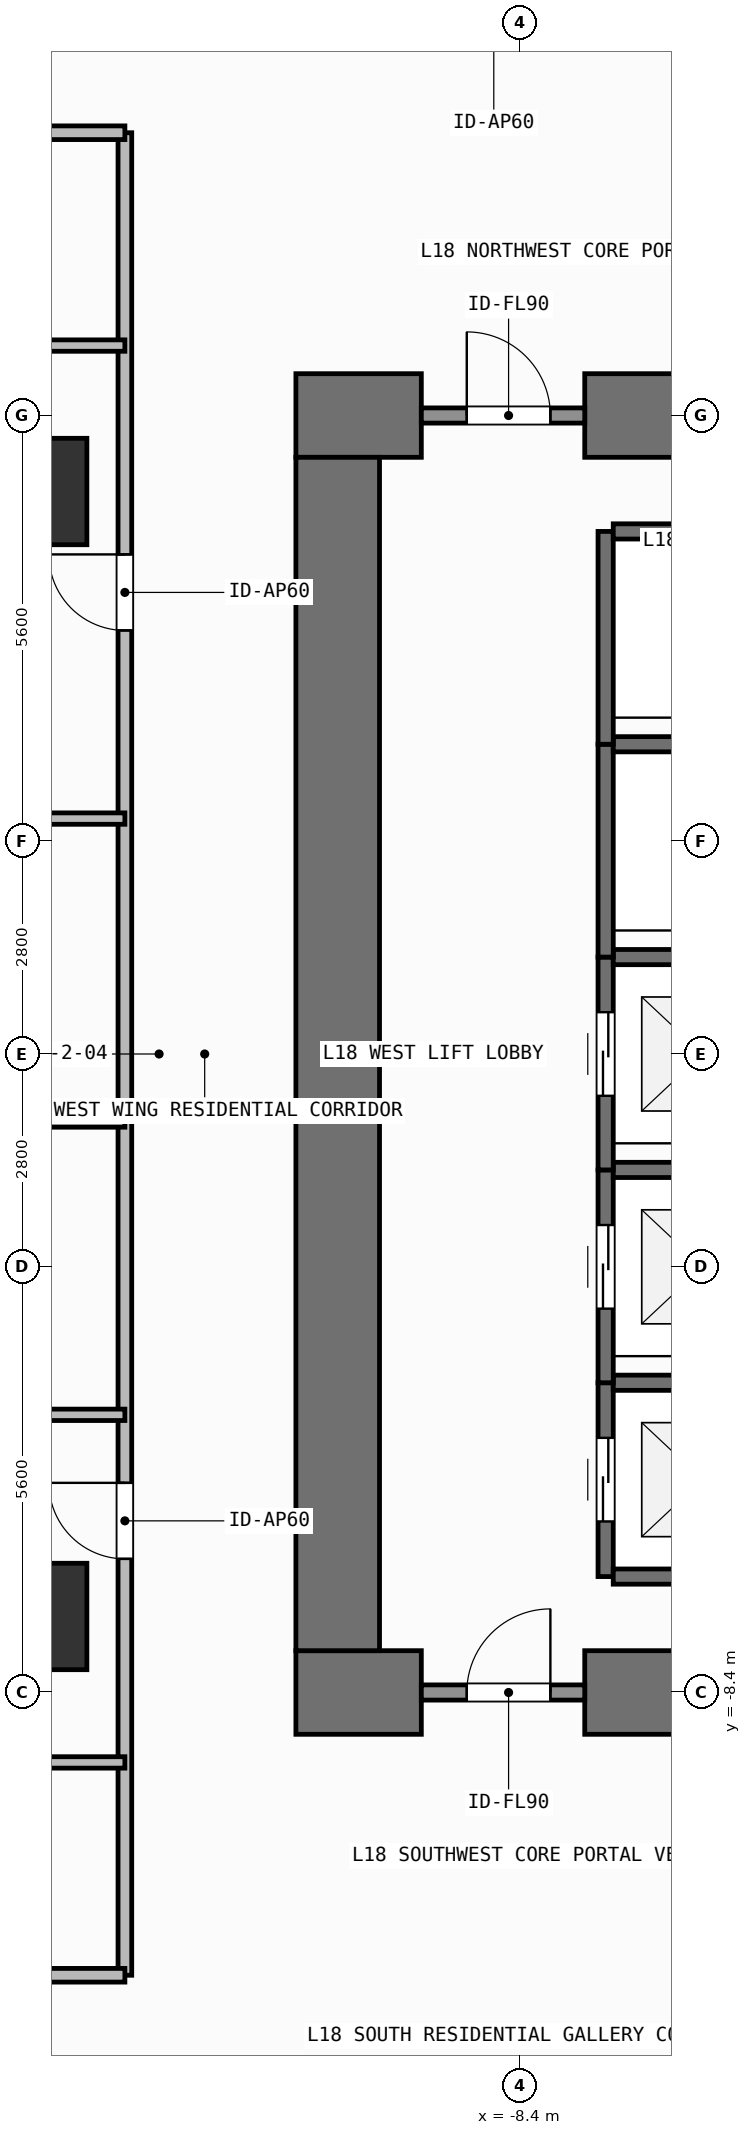
"""IFC4 building model, lengths in metres.
Left out: names, types, materials, properties, quantities, classifications, styles, units other than length and angle.
Written with IfcOpenShell. Run it as: python <this file> out.ifc"""

import sys

from ifc_helpers import new_model, si_unit, direction, frame, frame_2d, origin, origin_2d, place, context, subcontext, project, spatial, rectangle, extrude, element, fill, save


model = new_model("IFC4")
c1 = context("Model", 3, precision=1e-05, world=origin(), true_north=direction((0.0, 1.0)))
c2 = subcontext(c1, "Body", "Model", "MODEL_VIEW")
j1 = project(units=[si_unit("LENGTHUNIT", "METRE"), si_unit("PLANEANGLEUNIT", "RADIAN")], contexts=[c1])
p1 = place(None, origin())
s1 = spatial("IfcSite", under=j1, at=p1, CompositionType="ELEMENT")
p2 = place(p1, origin())
s2 = spatial("IfcBuilding", under=s1, at=p2, CompositionType="ELEMENT")
p3 = place(p2, frame((0.0, 0.0, 69.6)))
s3 = spatial("IfcBuildingStorey", under=s2, at=p3, CompositionType="ELEMENT", Elevation=69.6)
p4 = place(p3, frame((-11.35, -8.4, 0.0), z_axis=(0.0, 0.0, 1.0), x_axis=(1.0, 0.0, 0.0)))
e1 = element("IfcWall", 1, at=p4, inside=s3, PredefinedType="SHEAR", context=c2, shape_type="SweptSolid", body=[
    extrude(rectangle(XDim=1.65, YDim=1.1, at=frame_2d((0.825, 0.0))), origin(), (0.0, 0.0, 1.0), 3.9),
])
p5 = place(p3, frame((-7.55, -8.4, 0.0), z_axis=(0.0, 0.0, 1.0), x_axis=(1.0, 0.0, 0.0)))
e2 = element("IfcWall", 2, at=p5, inside=s3, PredefinedType="SHEAR", context=c2, shape_type="SweptSolid", body=[
    extrude(rectangle(XDim=3.35, YDim=1.1, at=frame_2d((1.675, 0.0))), origin(), (0.0, 0.0, 1.0), 3.9),
])
p6 = place(p3, frame((-11.35, 8.4, 0.0), z_axis=(0.0, 0.0, 1.0), x_axis=(1.0, 0.0, 0.0)))
e3 = element("IfcWall", 3, at=p6, inside=s3, PredefinedType="SHEAR", context=c2, shape_type="SweptSolid", body=[
    extrude(rectangle(XDim=1.65, YDim=1.1, at=frame_2d((0.825, 0.0))), origin(), (0.0, 0.0, 1.0), 3.9),
])
p7 = place(p3, frame((-7.55, 8.4, 0.0), z_axis=(0.0, 0.0, 1.0), x_axis=(1.0, 0.0, 0.0)))
e4 = element("IfcWall", 4, at=p7, inside=s3, PredefinedType="SHEAR", context=c2, shape_type="SweptSolid", body=[
    extrude(rectangle(XDim=16.5, YDim=1.1, at=frame_2d((8.25, 0.0))), origin(), (0.0, 0.0, 1.0), 3.9),
])
p8 = place(p3, frame((-10.8, -7.85, 0.0), z_axis=(0.0, 0.0, 1.0), x_axis=(0.0, 1.0, 0.0)))
e5 = element("IfcWall", 5, at=p8, inside=s3, PredefinedType="SHEAR", context=c2, shape_type="SweptSolid", body=[
    extrude(rectangle(XDim=15.7, YDim=1.1, at=frame_2d((7.85, 0.0))), origin(), (0.0, 0.0, 1.0), 3.9),
])
for number, where, z_axis, x_axis in (
    (6, (-14.8, -7.4, 0.0), (0.0, 0.0, 1.0), (1.0, 0.0, 0.0)),
    (7, (-14.8, 7.4, 0.0), (0.0, 0.0, 1.0), (1.0, 0.0, 0.0)),
):
    element("IfcColumn", number, at=place(p3, frame(where, z_axis=z_axis, x_axis=x_axis)), inside=s3, PredefinedType="COLUMN", context=c2, shape_type="SweptSolid", body=[
        extrude(rectangle(XDim=1.4, YDim=1.4, at=origin_2d()), origin(), (0.0, 0.0, 1.0), 3.9),
    ])
p9 = place(p3, frame((-7.275, -6.875, 0.0), z_axis=(0.0, 0.0, 1.0), x_axis=(0.0, 1.0, 0.0)))
e8 = element("IfcWall", 8, at=p9, inside=s3, PredefinedType="SHEAR", context=c2, shape_type="SweptSolid", body=[
    extrude(rectangle(XDim=2.55, YDim=0.2, at=frame_2d((1.275, 0.0))), origin(), (0.0, 0.0, 1.0), 3.68),
])
p10 = place(p9, frame((0.725, 0.0, 0.0)))
e9 = element("IfcOpeningElement", 9, at=p10, cuts=e8, PredefinedType="OPENING", context=c2, shape_type="SweptSolid", body=[
    extrude(rectangle(XDim=1.1, YDim=2.2, at=frame_2d((0.55, 1.1))), frame((0.0, 0.11, 0.0), z_axis=(0.0, -1.0, 0.0), x_axis=(1.0, 0.0, 0.0)), (0.0, 0.0, 1.0), 0.22),
])
for number, where, z_axis, x_axis in (
    (10, (-7.175, -6.875, 0.0), (0.0, 0.0, 1.0), (1.0, 0.0, 0.0)),
    (11, (-7.175, -4.325, 0.0), (0.0, 0.0, 1.0), (1.0, 0.0, 0.0)),
):
    element("IfcWall", number, at=place(p3, frame(where, z_axis=z_axis, x_axis=x_axis)), inside=s3, PredefinedType="SHEAR", context=c2, shape_type="SweptSolid", body=[
        extrude(rectangle(XDim=2.35, YDim=0.2, at=frame_2d((1.175, 0.0))), origin(), (0.0, 0.0, 1.0), 3.68),
    ])
p11 = place(p3, frame((-7.275, -4.325, 0.0), z_axis=(0.0, 0.0, 1.0), x_axis=(0.0, 1.0, 0.0)))
e12 = element("IfcWall", 12, at=p11, inside=s3, PredefinedType="SHEAR", context=c2, shape_type="SweptSolid", body=[
    extrude(rectangle(XDim=2.8, YDim=0.2, at=frame_2d((1.4, 0.0))), origin(), (0.0, 0.0, 1.0), 3.68),
])
p12 = place(p11, frame((0.975, 0.0, 0.0)))
e13 = element("IfcOpeningElement", 13, at=p12, cuts=e12, PredefinedType="OPENING", context=c2, shape_type="SweptSolid", body=[
    extrude(rectangle(XDim=1.1, YDim=2.2, at=frame_2d((0.55, 1.1))), frame((0.0, 0.11, 0.0), z_axis=(0.0, -1.0, 0.0), x_axis=(1.0, 0.0, 0.0)), (0.0, 0.0, 1.0), 0.22),
])
p13 = place(p3, frame((-7.175, -1.525, 0.0), z_axis=(0.0, 0.0, 1.0), x_axis=(1.0, 0.0, 0.0)))
e14 = element("IfcWall", 14, at=p13, inside=s3, PredefinedType="SHEAR", context=c2, shape_type="SweptSolid", body=[
    extrude(rectangle(XDim=2.35, YDim=0.2, at=frame_2d((1.175, 0.0))), origin(), (0.0, 0.0, 1.0), 3.68),
])
p14 = place(p3, frame((-7.275, -1.525, 0.0), z_axis=(0.0, 0.0, 1.0), x_axis=(0.0, 1.0, 0.0)))
e15 = element("IfcWall", 15, at=p14, inside=s3, PredefinedType="SHEAR", context=c2, shape_type="SweptSolid", body=[
    extrude(rectangle(XDim=2.8, YDim=0.2, at=frame_2d((1.4, 0.0))), origin(), (0.0, 0.0, 1.0), 3.68),
])
p15 = place(p14, frame((0.975, 0.0, 0.0)))
e16 = element("IfcOpeningElement", 16, at=p15, cuts=e15, PredefinedType="OPENING", context=c2, shape_type="SweptSolid", body=[
    extrude(rectangle(XDim=1.1, YDim=2.2, at=frame_2d((0.55, 1.1))), frame((0.0, 0.11, 0.0), z_axis=(0.0, -1.0, 0.0), x_axis=(1.0, 0.0, 0.0)), (0.0, 0.0, 1.0), 0.22),
])
p16 = place(p3, frame((-7.175, 1.275, 0.0), z_axis=(0.0, 0.0, 1.0), x_axis=(1.0, 0.0, 0.0)))
e17 = element("IfcWall", 17, at=p16, inside=s3, PredefinedType="SHEAR", context=c2, shape_type="SweptSolid", body=[
    extrude(rectangle(XDim=2.35, YDim=0.2, at=frame_2d((1.175, 0.0))), origin(), (0.0, 0.0, 1.0), 3.68),
])
p17 = place(p3, frame((-7.275, 1.275, 0.0), z_axis=(0.0, 0.0, 1.0), x_axis=(0.0, 1.0, 0.0)))
e18 = element("IfcWall", 18, at=p17, inside=s3, PredefinedType="SHEAR", context=c2, shape_type="SweptSolid", body=[
    extrude(rectangle(XDim=2.8, YDim=0.2, at=frame_2d((1.4, 0.0))), origin(), (0.0, 0.0, 1.0), 3.68),
])
p18 = place(p3, frame((-7.175, 4.075, 0.0), z_axis=(0.0, 0.0, 1.0), x_axis=(1.0, 0.0, 0.0)))
e19 = element("IfcWall", 19, at=p18, inside=s3, PredefinedType="SHEAR", context=c2, shape_type="SweptSolid", body=[
    extrude(rectangle(XDim=2.35, YDim=0.2, at=frame_2d((1.175, 0.0))), origin(), (0.0, 0.0, 1.0), 3.68),
])
p19 = place(p3, frame((-7.275, 4.075, 0.0), z_axis=(0.0, 0.0, 1.0), x_axis=(0.0, 1.0, 0.0)))
e20 = element("IfcWall", 20, at=p19, inside=s3, PredefinedType="SHEAR", context=c2, shape_type="SweptSolid", body=[
    extrude(rectangle(XDim=2.8, YDim=0.2, at=frame_2d((1.4, 0.0))), origin(), (0.0, 0.0, 1.0), 3.68),
])
p20 = place(p3, frame((-7.175, 6.875, 0.0), z_axis=(0.0, 0.0, 1.0), x_axis=(1.0, 0.0, 0.0)))
e21 = element("IfcWall", 21, at=p20, inside=s3, PredefinedType="SHEAR", context=c2, shape_type="SweptSolid", body=[
    extrude(rectangle(XDim=2.35, YDim=0.2, at=frame_2d((1.175, 0.0))), origin(), (0.0, 0.0, 1.0), 3.68),
])
p21 = place(p3, frame((-9.7, -8.4, 0.0), z_axis=(0.0, 0.0, 1.0), x_axis=(1.0, 0.0, 0.0)))
e22 = element("IfcWall", 22, at=p21, inside=s3, PredefinedType="SOLIDWALL", context=c2, shape_type="SweptSolid", body=[
    extrude(rectangle(XDim=2.15, YDim=0.2, at=frame_2d((1.075, 0.0))), origin(), (0.0, 0.0, 1.0), 2.72),
])
p22 = place(p21, frame((0.598, 0.0, 0.0)))
e23 = element("IfcOpeningElement", 23, at=p22, cuts=e22, PredefinedType="OPENING", context=c2, shape_type="SweptSolid", body=[
    extrude(rectangle(XDim=1.1, YDim=2.15, at=frame_2d((0.55, 1.075))), frame((0.0, 0.11, 0.0), z_axis=(0.0, -1.0, 0.0), x_axis=(1.0, 0.0, 0.0)), (0.0, 0.0, 1.0), 0.22),
])
p23 = place(p3, frame((-9.7, 8.4, 0.0), z_axis=(0.0, 0.0, 1.0), x_axis=(1.0, 0.0, 0.0)))
e24 = element("IfcWall", 24, at=p23, inside=s3, PredefinedType="SOLIDWALL", context=c2, shape_type="SweptSolid", body=[
    extrude(rectangle(XDim=2.15, YDim=0.2, at=frame_2d((1.075, 0.0))), origin(), (0.0, 0.0, 1.0), 2.72),
])
p24 = place(p23, frame((0.598, 0.0, 0.0)))
e25 = element("IfcOpeningElement", 25, at=p24, cuts=e24, PredefinedType="OPENING", context=c2, shape_type="SweptSolid", body=[
    extrude(rectangle(XDim=1.1, YDim=2.15, at=frame_2d((0.55, 1.075))), frame((0.0, 0.11, 0.0), z_axis=(0.0, -1.0, 0.0), x_axis=(1.0, 0.0, 0.0)), (0.0, 0.0, 1.0), 0.22),
])
p25 = place(p3, frame((-13.6, -12.12, 0.0), z_axis=(0.0, 0.0, 1.0), x_axis=(0.0, 1.0, 0.0)))
e26 = element("IfcWall", 26, at=p25, inside=s3, PredefinedType="PARTITIONING", context=c2, shape_type="SweptSolid", body=[
    extrude(rectangle(XDim=11.247, YDim=0.18, at=frame_2d((5.624, 0.0))), origin(), (0.0, 0.0, 1.0), 3.68),
])
p26 = place(p25, frame((5.478, 0.0, 0.0)))
e27 = element("IfcOpeningElement", 27, at=p26, cuts=e26, PredefinedType="OPENING", context=c2, shape_type="SweptSolid", body=[
    extrude(rectangle(XDim=1.0, YDim=2.2, at=frame_2d((0.5, 1.1))), frame((0.0, 0.1, 0.0), z_axis=(0.0, -1.0, 0.0), x_axis=(1.0, 0.0, 0.0)), (0.0, 0.0, 1.0), 0.2),
])
p27 = place(p3, frame((-19.553, -4.747, 0.0), z_axis=(0.0, 0.0, 1.0), x_axis=(1.0, 0.0, 0.0)))
e28 = element("IfcWall", 28, at=p27, inside=s3, PredefinedType="PARTITIONING", context=c2, shape_type="SweptSolid", body=[
    extrude(rectangle(XDim=5.953, YDim=0.15, at=frame_2d((2.977, 0.0))), origin(), (0.0, 0.0, 1.0), 3.68),
])
p28 = place(p27, frame((2.64, 0.0, 0.0)))
e29 = element("IfcOpeningElement", 29, at=p28, cuts=e28, PredefinedType="OPENING", context=c2, shape_type="SweptSolid", body=[
    extrude(rectangle(XDim=0.85, YDim=2.1, at=frame_2d((0.425, 1.05))), frame((0.0, 0.085, 0.0), z_axis=(0.0, -1.0, 0.0), x_axis=(1.0, 0.0, 0.0)), (0.0, 0.0, 1.0), 0.17),
])
p29 = place(p3, frame((-23.69, -9.32, 0.0), z_axis=(0.0, 0.0, 1.0), x_axis=(1.0, 0.0, 0.0)))
e30 = element("IfcWall", 30, at=p29, inside=s3, PredefinedType="PARTITIONING", context=c2, shape_type="SweptSolid", body=[
    extrude(rectangle(XDim=10.09, YDim=0.15, at=frame_2d((5.045, 0.0))), origin(), (0.0, 0.0, 1.0), 3.68),
])
p30 = place(p29, frame((5.512, 0.0, 0.0)))
e31 = element("IfcOpeningElement", 31, at=p30, cuts=e30, PredefinedType="OPENING", context=c2, shape_type="SweptSolid", body=[
    extrude(rectangle(XDim=0.85, YDim=2.1, at=frame_2d((0.425, 1.05))), frame((0.0, 0.085, 0.0), z_axis=(0.0, -1.0, 0.0), x_axis=(1.0, 0.0, 0.0)), (0.0, 0.0, 1.0), 0.17),
])
p31 = place(p3, frame((-13.6, -0.873, 0.0), z_axis=(0.0, 0.0, 1.0), x_axis=(0.0, 1.0, 0.0)))
e32 = element("IfcWall", 32, at=p31, inside=s3, PredefinedType="PARTITIONING", context=c2, shape_type="SweptSolid", body=[
    extrude(rectangle(XDim=12.993, YDim=0.18, at=frame_2d((6.497, 0.0))), origin(), (0.0, 0.0, 1.0), 3.68),
])
p32 = place(p31, frame((6.446, 0.0, 0.0)))
e33 = element("IfcOpeningElement", 33, at=p32, cuts=e32, PredefinedType="OPENING", context=c2, shape_type="SweptSolid", body=[
    extrude(rectangle(XDim=1.0, YDim=2.2, at=frame_2d((0.5, 1.1))), frame((0.0, 0.1, 0.0), z_axis=(0.0, -1.0, 0.0), x_axis=(1.0, 0.0, 0.0)), (0.0, 0.0, 1.0), 0.2),
])
p33 = place(p3, frame((-19.553, 9.32, 0.0), z_axis=(0.0, 0.0, 1.0), x_axis=(1.0, 0.0, 0.0)))
e34 = element("IfcWall", 34, at=p33, inside=s3, PredefinedType="PARTITIONING", context=c2, shape_type="SweptSolid", body=[
    extrude(rectangle(XDim=5.953, YDim=0.15, at=frame_2d((2.977, 0.0))), origin(), (0.0, 0.0, 1.0), 3.68),
])
p34 = place(p33, frame((2.64, 0.0, 0.0)))
e35 = element("IfcOpeningElement", 35, at=p34, cuts=e34, PredefinedType="OPENING", context=c2, shape_type="SweptSolid", body=[
    extrude(rectangle(XDim=0.85, YDim=2.1, at=frame_2d((0.425, 1.05))), frame((0.0, 0.085, 0.0), z_axis=(0.0, -1.0, 0.0), x_axis=(1.0, 0.0, 0.0)), (0.0, 0.0, 1.0), 0.17),
])
p35 = place(p3, frame((-23.69, 3.097, 0.0), z_axis=(0.0, 0.0, 1.0), x_axis=(1.0, 0.0, 0.0)))
e36 = element("IfcWall", 36, at=p35, inside=s3, PredefinedType="PARTITIONING", context=c2, shape_type="SweptSolid", body=[
    extrude(rectangle(XDim=10.09, YDim=0.15, at=frame_2d((5.045, 0.0))), origin(), (0.0, 0.0, 1.0), 3.68),
])
p36 = place(p35, frame((4.62, 0.0, 0.0)))
e37 = element("IfcOpeningElement", 37, at=p36, cuts=e36, PredefinedType="OPENING", context=c2, shape_type="SweptSolid", body=[
    extrude(rectangle(XDim=0.85, YDim=2.1, at=frame_2d((0.425, 1.05))), frame((0.0, 0.085, 0.0), z_axis=(0.0, -1.0, 0.0), x_axis=(1.0, 0.0, 0.0)), (0.0, 0.0, 1.0), 0.17),
])
for number, where, z_axis, x_axis in (
    (38, (-27.93, -0.873, 0.0), (0.0, 0.0, 1.0), (1.0, 0.0, 0.0)),
    (39, (-27.93, -12.12, 0.0), (0.0, 0.0, 1.0), (1.0, 0.0, 0.0)),
    (40, (-27.93, 12.12, 0.0), (0.0, 0.0, 1.0), (1.0, 0.0, 0.0)),
):
    element("IfcWall", number, at=place(p3, frame(where, z_axis=z_axis, x_axis=x_axis)), inside=s3, PredefinedType="PARTITIONING", context=c2, shape_type="SweptSolid", body=[
        extrude(rectangle(XDim=14.33, YDim=0.18, at=frame_2d((7.165, 0.0))), origin(), (0.0, 0.0, 1.0), 3.68),
    ])
p37 = place(p10, origin())
e41 = element("IfcDoor", 41, at=p37, inside=s3, OperationType="SLIDING_TO_LEFT", PredefinedType="DOOR", context=c2, shape_type="SweptSolid", body=[
    extrude(rectangle(XDim=1.1, YDim=2.2, at=frame_2d((0.55, 1.1))), frame((0.0, 0.025, 0.0), z_axis=(0.0, -1.0, 0.0), x_axis=(1.0, 0.0, 0.0)), (0.0, 0.0, 1.0), 0.05),
])
fill(e9, e41)
p38 = place(p12, origin())
e42 = element("IfcDoor", 42, at=p38, inside=s3, OperationType="SLIDING_TO_LEFT", PredefinedType="DOOR", context=c2, shape_type="SweptSolid", body=[
    extrude(rectangle(XDim=1.1, YDim=2.2, at=frame_2d((0.55, 1.1))), frame((0.0, 0.025, 0.0), z_axis=(0.0, -1.0, 0.0), x_axis=(1.0, 0.0, 0.0)), (0.0, 0.0, 1.0), 0.05),
])
fill(e13, e42)
p39 = place(p15, origin())
e43 = element("IfcDoor", 43, at=p39, inside=s3, OperationType="SLIDING_TO_LEFT", PredefinedType="DOOR", context=c2, shape_type="SweptSolid", body=[
    extrude(rectangle(XDim=1.1, YDim=2.2, at=frame_2d((0.55, 1.1))), frame((0.0, 0.025, 0.0), z_axis=(0.0, -1.0, 0.0), x_axis=(1.0, 0.0, 0.0)), (0.0, 0.0, 1.0), 0.05),
])
fill(e16, e43)
p40 = place(p22, origin())
e44 = element("IfcDoor", 44, at=p40, inside=s3, OperationType="SINGLE_SWING_RIGHT", PredefinedType="DOOR", context=c2, shape_type="SweptSolid", body=[
    extrude(rectangle(XDim=1.1, YDim=2.15, at=frame_2d((0.55, 1.075))), frame((0.0, 0.025, 0.0), z_axis=(0.0, -1.0, 0.0), x_axis=(1.0, 0.0, 0.0)), (0.0, 0.0, 1.0), 0.05),
])
fill(e23, e44)
p41 = place(p24, origin())
e45 = element("IfcDoor", 45, at=p41, inside=s3, OperationType="SINGLE_SWING_LEFT", PredefinedType="DOOR", context=c2, shape_type="SweptSolid", body=[
    extrude(rectangle(XDim=1.1, YDim=2.15, at=frame_2d((0.55, 1.075))), frame((0.0, 0.025, 0.0), z_axis=(0.0, -1.0, 0.0), x_axis=(1.0, 0.0, 0.0)), (0.0, 0.0, 1.0), 0.05),
])
fill(e25, e45)
p42 = place(p26, origin())
e46 = element("IfcDoor", 46, at=p42, inside=s3, OperationType="SINGLE_SWING_RIGHT", PredefinedType="DOOR", context=c2, shape_type="SweptSolid", body=[
    extrude(rectangle(XDim=1.0, YDim=2.2, at=frame_2d((0.5, 1.1))), frame((0.0, 0.025, 0.0), z_axis=(0.0, -1.0, 0.0), x_axis=(1.0, 0.0, 0.0)), (0.0, 0.0, 1.0), 0.05),
])
fill(e27, e46)
p43 = place(p32, origin())
e47 = element("IfcDoor", 47, at=p43, inside=s3, OperationType="SINGLE_SWING_RIGHT", PredefinedType="DOOR", context=c2, shape_type="SweptSolid", body=[
    extrude(rectangle(XDim=1.0, YDim=2.2, at=frame_2d((0.5, 1.1))), frame((0.0, 0.025, 0.0), z_axis=(0.0, -1.0, 0.0), x_axis=(1.0, 0.0, 0.0)), (0.0, 0.0, 1.0), 0.05),
])
fill(e33, e47)
save(model, sys.argv[1])
